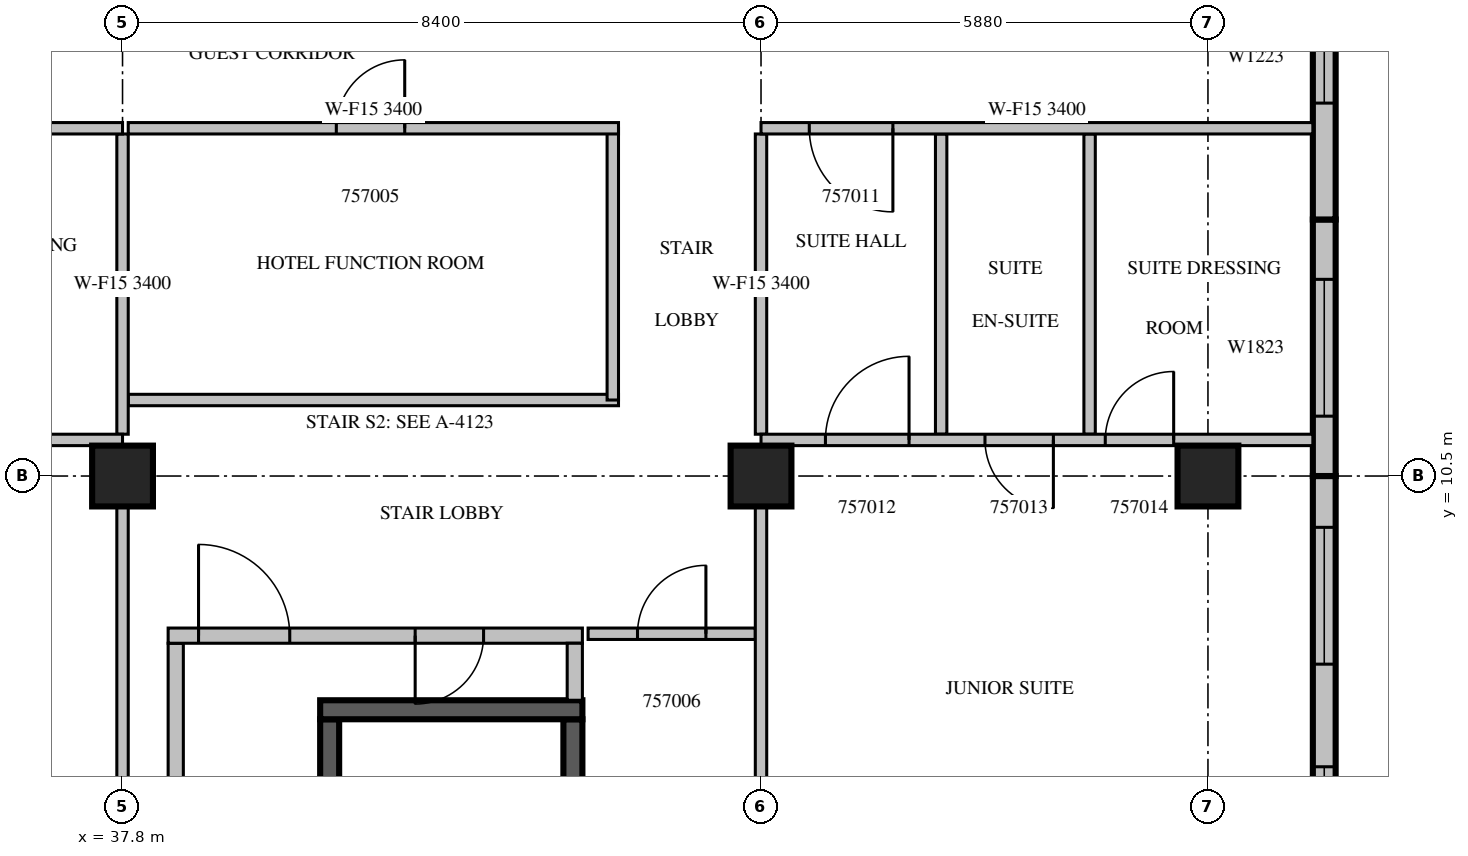
"""IFC4 building model, lengths in metres.
Left out: names, types, materials, properties, quantities, classifications, styles, units other than length and angle.
Written with IfcOpenShell. Run it as: python <this file> out.ifc"""

import sys

from ifc_helpers import new_model, si_unit, direction, frame, frame_2d, origin, origin_2d, place, context, subcontext, project, spatial, rectangle, extrude, source, transform, mapped, element, fill, save


model = new_model("IFC4")
c1 = context("Model", 3, precision=1e-05, world=origin(), true_north=direction((0.0, 1.0)))
c2 = subcontext(c1, "Body", "Model", "MODEL_VIEW")
j1 = project(units=[si_unit("LENGTHUNIT", "METRE"), si_unit("PLANEANGLEUNIT", "RADIAN")], contexts=[c1])
p1 = place(None, origin())
s1 = spatial("IfcSite", under=j1, at=p1, CompositionType="ELEMENT")
p2 = place(p1, origin())
s2 = spatial("IfcBuilding", under=s1, at=p2, CompositionType="ELEMENT")
p3 = place(p2, frame((0.0, 0.0, 250.0)))
s3 = spatial("IfcBuildingStorey", under=s2, at=p3, CompositionType="ELEMENT", Elevation=250.0)
m1 = source(origin(), c2, "Body", "SweptSolid", [
    extrude(rectangle(XDim=0.8, YDim=0.8, at=origin_2d()), origin(), (0.0, 0.0, 1.0), 3.8),
])
for number, where, z_axis, x_axis in (
    (1, (37.8, 10.5, 0.0), (0.0, 0.0, 1.0), (1.0, 0.0, 0.0)),
    (2, (46.2, 10.5, 0.0), (0.0, 0.0, 1.0), (1.0, 0.0, 0.0)),
    (3, (52.08, 10.5, 0.0), (0.0, 0.0, 1.0), (1.0, 0.0, 0.0)),
):
    element("IfcColumn", number, at=place(p3, frame(where, z_axis=z_axis, x_axis=x_axis)), inside=s3, PredefinedType="COLUMN", context=c2, shape_type="MappedRepresentation", body=[
        mapped(m1, transform((0.0, 0.0, 0.0), scale=1.0)),
    ])
m2 = source(origin(), c2, "Body", "SweptSolid", [
    extrude(rectangle(XDim=6.3, YDim=0.3, at=frame_2d((3.15, 0.0))), origin(), (0.0, 0.0, 1.0), 3.4),
])
p4 = place(p3, frame((53.61, 4.2, 0.0), z_axis=(0.0, 0.0, 1.0), x_axis=(0.0, 1.0, 0.0)))
e4 = element("IfcWall", 4, at=p4, inside=s3, PredefinedType="STANDARD", context=c2, shape_type="MappedRepresentation", body=[
    mapped(m2, transform((0.0, 0.0, 0.0), scale=1.0)),
])
m3 = source(origin(), c2, "Body", "SweptSolid", [
    extrude(rectangle(XDim=1.8, YDim=2.3, at=frame_2d((0.9, 1.15))), frame((0.0, 0.16, 0.0), z_axis=(0.0, -1.0, 0.0), x_axis=(1.0, 0.0, 0.0)), (0.0, 0.0, 1.0), 0.32),
])
p5 = place(p4, frame((0.675, 0.0, 0.6)))
e5 = element("IfcOpeningElement", 5, at=p5, cuts=e4, PredefinedType="OPENING", context=c2, shape_type="MappedRepresentation", body=[
    mapped(m3, transform((0.0, 0.0, 0.0), scale=1.0)),
])
p6 = place(p4, frame((3.825, 0.0, 0.6)))
e6 = element("IfcOpeningElement", 6, at=p6, cuts=e4, PredefinedType="OPENING", context=c2, shape_type="MappedRepresentation", body=[
    mapped(m3, transform((0.0, 0.0, 0.0), scale=1.0)),
])
m4 = source(origin(), c2, "Body", "SweptSolid", [
    extrude(rectangle(XDim=3.375, YDim=0.3, at=frame_2d((1.688, 0.0))), origin(), (0.0, 0.0, 1.0), 3.4),
])
p7 = place(p3, frame((53.61, 10.5, 0.0), z_axis=(0.0, 0.0, 1.0), x_axis=(0.0, 1.0, 0.0)))
e7 = element("IfcWall", 7, at=p7, inside=s3, PredefinedType="STANDARD", context=c2, shape_type="MappedRepresentation", body=[
    mapped(m4, transform((0.0, 0.0, 0.0), scale=1.0)),
])
p8 = place(p7, frame((0.787, 0.0, 0.6)))
e8 = element("IfcOpeningElement", 8, at=p8, cuts=e7, PredefinedType="OPENING", context=c2, shape_type="MappedRepresentation", body=[
    mapped(m3, transform((0.0, 0.0, 0.0), scale=1.0)),
])
p9 = place(p3, frame((53.61, 13.875, 0.0), z_axis=(0.0, 0.0, 1.0), x_axis=(0.0, 1.0, 0.0)))
e9 = element("IfcWall", 9, at=p9, inside=s3, PredefinedType="STANDARD", context=c2, shape_type="MappedRepresentation", body=[
    mapped(m4, transform((0.0, 0.0, 0.0), scale=1.0)),
])
m5 = source(origin(), c2, "Body", "SweptSolid", [
    extrude(rectangle(XDim=1.2, YDim=2.3, at=frame_2d((0.6, 1.15))), frame((0.0, 0.16, 0.0), z_axis=(0.0, -1.0, 0.0), x_axis=(1.0, 0.0, 0.0)), (0.0, 0.0, 1.0), 0.32),
])
p10 = place(p9, frame((1.531, 0.0, 0.6)))
e10 = element("IfcOpeningElement", 10, at=p10, cuts=e9, PredefinedType="OPENING", context=c2, shape_type="MappedRepresentation", body=[
    mapped(m5, transform((0.0, 0.0, 0.0), scale=1.0)),
])
m6 = source(origin(), c2, "Body", "SweptSolid", [
    extrude(rectangle(XDim=7.0, YDim=0.25, at=frame_2d((3.5, 0.0))), origin(), (0.0, 0.0, 1.0), 3.4),
])
p11 = place(p3, frame((40.525, 0.3, 0.0), z_axis=(0.0, 0.0, 1.0), x_axis=(0.0, 1.0, 0.0)))
e11 = element("IfcWall", 11, at=p11, inside=s3, PredefinedType="SOLIDWALL", context=c2, shape_type="MappedRepresentation", body=[
    mapped(m6, transform((0.0, 0.0, 0.0), scale=1.0)),
])
m7 = source(origin(), c2, "Body", "SweptSolid", [
    extrude(rectangle(XDim=1.1, YDim=2.1, at=frame_2d((0.55, 1.05))), frame((0.0, 0.135, 0.0), z_axis=(0.0, -1.0, 0.0), x_axis=(1.0, 0.0, 0.0)), (0.0, 0.0, 1.0), 0.27),
])
p12 = place(p11, frame((0.55, 0.0, 0.0)))
e12 = element("IfcOpeningElement", 12, at=p12, cuts=e11, PredefinedType="OPENING", context=c2, shape_type="MappedRepresentation", body=[
    mapped(m7, transform((0.0, 0.0, 0.0), scale=1.0)),
])
p13 = place(p3, frame((43.725, 0.3, 0.0), z_axis=(0.0, 0.0, 1.0), x_axis=(0.0, 1.0, 0.0)))
e13 = element("IfcWall", 13, at=p13, inside=s3, PredefinedType="SOLIDWALL", context=c2, shape_type="MappedRepresentation", body=[
    mapped(m6, transform((0.0, 0.0, 0.0), scale=1.0)),
])
m8 = source(origin(), c2, "Body", "SweptSolid", [
    extrude(rectangle(XDim=3.45, YDim=0.25, at=frame_2d((1.725, 0.0))), origin(), (0.0, 0.0, 1.0), 3.4),
])
p14 = place(p3, frame((40.4, 7.425, 0.0), z_axis=(0.0, 0.0, 1.0), x_axis=(1.0, 0.0, 0.0)))
e14 = element("IfcWall", 14, at=p14, inside=s3, PredefinedType="SOLIDWALL", context=c2, shape_type="MappedRepresentation", body=[
    mapped(m8, transform((0.0, 0.0, 0.0), scale=1.0)),
])
m9 = source(origin(), c2, "Body", "SweptSolid", [
    extrude(rectangle(XDim=8.0, YDim=0.2, at=frame_2d((4.0, 0.0))), origin(), (0.0, 0.0, 1.0), 3.4),
])
p15 = place(p3, frame((38.5, 0.3, 0.0), z_axis=(0.0, 0.0, 1.0), x_axis=(0.0, 1.0, 0.0)))
e15 = element("IfcWall", 15, at=p15, inside=s3, PredefinedType="PARTITIONING", context=c2, shape_type="MappedRepresentation", body=[
    mapped(m9, transform((0.0, 0.0, 0.0), scale=1.0)),
])
m10 = source(origin(), c2, "Body", "SweptSolid", [
    extrude(rectangle(XDim=5.45, YDim=0.2, at=frame_2d((2.725, 0.0))), origin(), (0.0, 0.0, 1.0), 3.4),
])
p16 = place(p3, frame((38.4, 8.4, 0.0), z_axis=(0.0, 0.0, 1.0), x_axis=(1.0, 0.0, 0.0)))
e16 = element("IfcWall", 16, at=p16, inside=s3, PredefinedType="PARTITIONING", context=c2, shape_type="MappedRepresentation", body=[
    mapped(m10, transform((0.0, 0.0, 0.0), scale=1.0)),
])
m11 = source(origin(), c2, "Body", "SweptSolid", [
    extrude(rectangle(XDim=1.2, YDim=2.1, at=frame_2d((0.6, 1.05))), frame((0.0, 0.11, 0.0), z_axis=(0.0, -1.0, 0.0), x_axis=(1.0, 0.0, 0.0)), (0.0, 0.0, 1.0), 0.22),
])
p17 = place(p16, frame((0.4, 0.0, 0.0)))
e17 = element("IfcOpeningElement", 17, at=p17, cuts=e16, PredefinedType="OPENING", context=c2, shape_type="MappedRepresentation", body=[
    mapped(m11, transform((0.0, 0.0, 0.0), scale=1.0)),
])
m12 = source(origin(), c2, "Body", "SweptSolid", [
    extrude(rectangle(XDim=0.9, YDim=2.1, at=frame_2d((0.45, 1.05))), frame((0.0, 0.11, 0.0), z_axis=(0.0, -1.0, 0.0), x_axis=(1.0, 0.0, 0.0)), (0.0, 0.0, 1.0), 0.22),
])
p18 = place(p16, frame((3.25, 0.0, 0.0)))
e18 = element("IfcOpeningElement", 18, at=p18, cuts=e16, PredefinedType="OPENING", context=c2, shape_type="MappedRepresentation", body=[
    mapped(m12, transform((0.0, 0.0, 0.0), scale=1.0)),
])
m13 = source(origin(), c2, "Body", "SweptSolid", [
    extrude(rectangle(XDim=0.75, YDim=0.2, at=frame_2d((0.375, 0.0))), origin(), (0.0, 0.0, 1.0), 3.4),
])
p19 = place(p3, frame((43.75, 7.55, 0.0), z_axis=(0.0, 0.0, 1.0), x_axis=(0.0, 1.0, 0.0)))
e19 = element("IfcWall", 19, at=p19, inside=s3, PredefinedType="PARTITIONING", context=c2, shape_type="MappedRepresentation", body=[
    mapped(m13, transform((0.0, 0.0, 0.0), scale=1.0)),
])
m14 = source(origin(), c2, "Body", "SweptSolid", [
    extrude(rectangle(XDim=6.45, YDim=0.15, at=frame_2d((3.225, 0.0))), origin(), (0.0, 0.0, 1.0), 3.4),
])
p20 = place(p3, frame((37.875, 11.5, 0.0), z_axis=(0.0, 0.0, 1.0), x_axis=(1.0, 0.0, 0.0)))
e20 = element("IfcWall", 20, at=p20, inside=s3, PredefinedType="PARTITIONING", context=c2, shape_type="MappedRepresentation", body=[
    mapped(m14, transform((0.0, 0.0, 0.0), scale=1.0)),
])
m15 = source(origin(), c2, "Body", "SweptSolid", [
    extrude(rectangle(XDim=3.575, YDim=0.15, at=frame_2d((1.788, 0.0))), origin(), (0.0, 0.0, 1.0), 3.4),
])
p21 = place(p3, frame((44.25, 11.5, 0.0), z_axis=(0.0, 0.0, 1.0), x_axis=(0.0, 1.0, 0.0)))
e21 = element("IfcWall", 21, at=p21, inside=s3, PredefinedType="PARTITIONING", context=c2, shape_type="MappedRepresentation", body=[
    mapped(m15, transform((0.0, 0.0, 0.0), scale=1.0)),
])
p22 = place(p3, frame((44.325, 15.075, 0.0), z_axis=(0.0, 0.0, 1.0), x_axis=(-1.0, 0.0, 0.0)))
e22 = element("IfcWall", 22, at=p22, inside=s3, PredefinedType="PARTITIONING", context=c2, shape_type="MappedRepresentation", body=[
    mapped(m14, transform((0.0, 0.0, 0.0), scale=1.0)),
])
m16 = source(origin(), c2, "Body", "SweptSolid", [
    extrude(rectangle(XDim=0.9, YDim=2.1, at=frame_2d((0.45, 1.05))), frame((0.0, 0.085, 0.0), z_axis=(0.0, -1.0, 0.0), x_axis=(1.0, 0.0, 0.0)), (0.0, 0.0, 1.0), 0.17),
])
p23 = place(p22, frame((2.812, 0.0, 0.0)))
e23 = element("IfcOpeningElement", 23, at=p23, cuts=e22, PredefinedType="OPENING", context=c2, shape_type="MappedRepresentation", body=[
    mapped(m16, transform((0.0, 0.0, 0.0), scale=1.0)),
])
m17 = source(origin(), c2, "Body", "SweptSolid", [
    extrude(rectangle(XDim=2.2, YDim=0.15, at=frame_2d((1.1, 0.0))), origin(), (0.0, 0.0, 1.0), 3.4),
])
p24 = place(p3, frame((46.125, 8.425, 0.0), z_axis=(0.0, 0.0, 1.0), x_axis=(-1.0, 0.0, 0.0)))
e24 = element("IfcWall", 24, at=p24, inside=s3, PredefinedType="PARTITIONING", context=c2, shape_type="MappedRepresentation", body=[
    mapped(m17, transform((0.0, 0.0, 0.0), scale=1.0)),
])
p25 = place(p24, frame((0.65, 0.0, 0.0)))
e25 = element("IfcOpeningElement", 25, at=p25, cuts=e24, PredefinedType="OPENING", context=c2, shape_type="MappedRepresentation", body=[
    mapped(m16, transform((0.0, 0.0, 0.0), scale=1.0)),
])
m18 = source(origin(), c2, "Body", "SweptSolid", [
    extrude(rectangle(XDim=9.302, YDim=0.15, at=frame_2d((4.651, 0.0))), origin(), (0.0, 0.0, 1.0), 3.4),
])
p26 = place(p3, frame((37.8, 0.799, 0.0), z_axis=(0.0, 0.0, 1.0), x_axis=(0.0, 1.0, 0.0)))
e26 = element("IfcWall", 26, at=p26, inside=s3, PredefinedType="PARTITIONING", context=c2, shape_type="MappedRepresentation", body=[
    mapped(m18, transform((0.0, 0.0, 0.0), scale=1.0)),
])
m19 = source(origin(), c2, "Body", "SweptSolid", [
    extrude(rectangle(XDim=3.95, YDim=0.15, at=frame_2d((1.975, 0.0))), origin(), (0.0, 0.0, 1.0), 3.4),
])
p27 = place(p3, frame((37.8, 11.05, 0.0), z_axis=(0.0, 0.0, 1.0), x_axis=(0.0, 1.0, 0.0)))
e27 = element("IfcWall", 27, at=p27, inside=s3, PredefinedType="PARTITIONING", context=c2, shape_type="MappedRepresentation", body=[
    mapped(m19, transform((0.0, 0.0, 0.0), scale=1.0)),
])
m20 = source(origin(), c2, "Body", "SweptSolid", [
    extrude(rectangle(XDim=8.4, YDim=0.15, at=frame_2d((4.2, 0.0))), origin(), (0.0, 0.0, 1.0), 2.9),
])
p28 = place(p3, frame((37.8, 10.975, 0.0), z_axis=(0.0, 0.0, 1.0), x_axis=(-1.0, 0.0, 0.0)))
e28 = element("IfcWall", 28, at=p28, inside=s3, PredefinedType="PARTITIONING", context=c2, shape_type="MappedRepresentation", body=[
    mapped(m20, transform((0.0, 0.0, 0.0), scale=1.0)),
])
m21 = source(origin(), c2, "Body", "SweptSolid", [
    extrude(rectangle(XDim=1.1, YDim=2.1, at=frame_2d((0.55, 1.05))), frame((0.0, 0.085, 0.0), z_axis=(0.0, -1.0, 0.0), x_axis=(1.0, 0.0, 0.0)), (0.0, 0.0, 1.0), 0.17),
])
p29 = place(p28, frame((6.449, 0.0, 0.0)))
e29 = element("IfcOpeningElement", 29, at=p29, cuts=e28, PredefinedType="OPENING", context=c2, shape_type="MappedRepresentation", body=[
    mapped(m21, transform((0.0, 0.0, 0.0), scale=1.0)),
])
p30 = place(p28, frame((4.12, 0.0, 0.0)))
e30 = element("IfcOpeningElement", 30, at=p30, cuts=e28, PredefinedType="OPENING", context=c2, shape_type="MappedRepresentation", body=[
    mapped(m16, transform((0.0, 0.0, 0.0), scale=1.0)),
])
p31 = place(p28, frame((1.321, 0.0, 0.0)))
e31 = element("IfcOpeningElement", 31, at=p31, cuts=e28, PredefinedType="OPENING", context=c2, shape_type="MappedRepresentation", body=[
    mapped(m16, transform((0.0, 0.0, 0.0), scale=1.0)),
])
for number, where, z_axis, x_axis in (
    (32, (48.57, 11.05, 0.0), (0.0, 0.0, 1.0), (0.0, 1.0, 0.0)),
    (33, (50.523, 11.05, 0.0), (0.0, 0.0, 1.0), (0.0, 1.0, 0.0)),
):
    element("IfcWall", number, at=place(p3, frame(where, z_axis=z_axis, x_axis=x_axis)), inside=s3, PredefinedType="PARTITIONING", context=c2, shape_type="MappedRepresentation", body=[
        mapped(m19, transform((0.0, 0.0, 0.0), scale=1.0)),
    ])
p32 = place(p3, frame((46.2, 0.799, 0.0), z_axis=(0.0, 0.0, 1.0), x_axis=(0.0, 1.0, 0.0)))
e34 = element("IfcWall", 34, at=p32, inside=s3, PredefinedType="PARTITIONING", context=c2, shape_type="MappedRepresentation", body=[
    mapped(m18, transform((0.0, 0.0, 0.0), scale=1.0)),
])
p33 = place(p3, frame((46.2, 11.05, 0.0), z_axis=(0.0, 0.0, 1.0), x_axis=(0.0, 1.0, 0.0)))
e35 = element("IfcWall", 35, at=p33, inside=s3, PredefinedType="PARTITIONING", context=c2, shape_type="MappedRepresentation", body=[
    mapped(m19, transform((0.0, 0.0, 0.0), scale=1.0)),
])
m22 = source(origin(), c2, "Body", "SweptSolid", [
    extrude(rectangle(XDim=7.26, YDim=0.15, at=frame_2d((3.63, 0.0))), origin(), (0.0, 0.0, 1.0), 3.4),
])
p34 = place(p3, frame((53.46, 10.975, 0.0), z_axis=(0.0, 0.0, 1.0), x_axis=(-1.0, 0.0, 0.0)))
e36 = element("IfcWall", 36, at=p34, inside=s3, PredefinedType="PARTITIONING", context=c2, shape_type="MappedRepresentation", body=[
    mapped(m22, transform((0.0, 0.0, 0.0), scale=1.0)),
])
p35 = place(p34, frame((5.313, 0.0, 0.0)))
e37 = element("IfcOpeningElement", 37, at=p35, cuts=e36, PredefinedType="OPENING", context=c2, shape_type="MappedRepresentation", body=[
    mapped(m21, transform((0.0, 0.0, 0.0), scale=1.0)),
])
p36 = place(p34, frame((3.414, 0.0, 0.0)))
e38 = element("IfcOpeningElement", 38, at=p36, cuts=e36, PredefinedType="OPENING", context=c2, shape_type="MappedRepresentation", body=[
    mapped(m16, transform((0.0, 0.0, 0.0), scale=1.0)),
])
p37 = place(p34, frame((1.831, 0.0, 0.0)))
e39 = element("IfcOpeningElement", 39, at=p37, cuts=e36, PredefinedType="OPENING", context=c2, shape_type="MappedRepresentation", body=[
    mapped(m16, transform((0.0, 0.0, 0.0), scale=1.0)),
])
p38 = place(p3, frame((37.8, 15.075, 0.0), z_axis=(0.0, 0.0, 1.0), x_axis=(-1.0, 0.0, 0.0)))
e40 = element("IfcWall", 40, at=p38, inside=s3, PredefinedType="PARTITIONING", context=c2, shape_type="MappedRepresentation", body=[
    mapped(m20, transform((0.0, 0.0, 0.0), scale=1.0)),
])
p39 = place(p38, frame((6.662, 0.0, 0.0)))
e41 = element("IfcOpeningElement", 41, at=p39, cuts=e40, PredefinedType="OPENING", context=c2, shape_type="MappedRepresentation", body=[
    mapped(m21, transform((0.0, 0.0, 0.0), scale=1.0)),
])
p40 = place(p3, frame((53.46, 15.075, 0.0), z_axis=(0.0, 0.0, 1.0), x_axis=(-1.0, 0.0, 0.0)))
e42 = element("IfcWall", 42, at=p40, inside=s3, PredefinedType="PARTITIONING", context=c2, shape_type="MappedRepresentation", body=[
    mapped(m22, transform((0.0, 0.0, 0.0), scale=1.0)),
])
p41 = place(p40, frame((5.525, 0.0, 0.0)))
e43 = element("IfcOpeningElement", 43, at=p41, cuts=e42, PredefinedType="OPENING", context=c2, shape_type="MappedRepresentation", body=[
    mapped(m21, transform((0.0, 0.0, 0.0), scale=1.0)),
])
m23 = source(origin(), c2, "Body", "SweptSolid", [
    extrude(rectangle(XDim=1.8, YDim=2.3, at=frame_2d((0.9, 1.15))), frame((0.0, 0.03, 0.0), z_axis=(0.0, -1.0, 0.0), x_axis=(1.0, 0.0, 0.0)), (0.0, 0.0, 1.0), 0.06),
])
p42 = place(p5, origin())
e44 = element("IfcWindow", 44, at=p42, inside=s3, PartitioningType="SINGLE_PANEL", PredefinedType="WINDOW", context=c2, shape_type="MappedRepresentation", body=[
    mapped(m23, transform((0.0, 0.0, 0.0), scale=1.0)),
])
fill(e5, e44)
p43 = place(p6, origin())
e45 = element("IfcWindow", 45, at=p43, inside=s3, PartitioningType="SINGLE_PANEL", PredefinedType="WINDOW", context=c2, shape_type="MappedRepresentation", body=[
    mapped(m23, transform((0.0, 0.0, 0.0), scale=1.0)),
])
fill(e6, e45)
p44 = place(p8, origin())
e46 = element("IfcWindow", 46, at=p44, inside=s3, PartitioningType="SINGLE_PANEL", PredefinedType="WINDOW", context=c2, shape_type="MappedRepresentation", body=[
    mapped(m23, transform((0.0, 0.0, 0.0), scale=1.0)),
])
fill(e8, e46)
m24 = source(origin(), c2, "Body", "SweptSolid", [
    extrude(rectangle(XDim=1.2, YDim=2.3, at=frame_2d((0.6, 1.15))), frame((0.0, 0.03, 0.0), z_axis=(0.0, -1.0, 0.0), x_axis=(1.0, 0.0, 0.0)), (0.0, 0.0, 1.0), 0.06),
])
p45 = place(p10, origin())
e47 = element("IfcWindow", 47, at=p45, inside=s3, PartitioningType="SINGLE_PANEL", PredefinedType="WINDOW", context=c2, shape_type="MappedRepresentation", body=[
    mapped(m24, transform((0.0, 0.0, 0.0), scale=1.0)),
])
fill(e10, e47)
m25 = source(origin(), c2, "Body", "SweptSolid", [
    extrude(rectangle(XDim=1.2, YDim=2.1, at=frame_2d((0.6, 1.05))), frame((0.0, 0.025, 0.0), z_axis=(0.0, -1.0, 0.0), x_axis=(1.0, 0.0, 0.0)), (0.0, 0.0, 1.0), 0.05),
])
p46 = place(p17, origin())
e48 = element("IfcDoor", 48, at=p46, inside=s3, OperationType="SINGLE_SWING_LEFT", PredefinedType="DOOR", context=c2, shape_type="MappedRepresentation", body=[
    mapped(m25, transform((0.0, 0.0, 0.0), scale=1.0)),
])
fill(e17, e48)
m26 = source(origin(), c2, "Body", "SweptSolid", [
    extrude(rectangle(XDim=0.9, YDim=2.1, at=frame_2d((0.45, 1.05))), frame((0.0, 0.025, 0.0), z_axis=(0.0, -1.0, 0.0), x_axis=(1.0, 0.0, 0.0)), (0.0, 0.0, 1.0), 0.05),
])
p47 = place(p18, origin())
e49 = element("IfcDoor", 49, at=p47, inside=s3, OperationType="SINGLE_SWING_RIGHT", PredefinedType="DOOR", context=c2, shape_type="MappedRepresentation", body=[
    mapped(m26, transform((0.0, 0.0, 0.0), scale=1.0)),
])
fill(e18, e49)
p48 = place(p23, origin())
e50 = element("IfcDoor", 50, at=p48, inside=s3, OperationType="SINGLE_SWING_RIGHT", PredefinedType="DOOR", context=c2, shape_type="MappedRepresentation", body=[
    mapped(m26, transform((0.0, 0.0, 0.0), scale=1.0)),
])
fill(e23, e50)
p49 = place(p25, origin())
e51 = element("IfcDoor", 51, at=p49, inside=s3, OperationType="SINGLE_SWING_RIGHT", PredefinedType="DOOR", context=c2, shape_type="MappedRepresentation", body=[
    mapped(m26, transform((0.0, 0.0, 0.0), scale=1.0)),
])
fill(e25, e51)
m27 = source(origin(), c2, "Body", "SweptSolid", [
    extrude(rectangle(XDim=1.1, YDim=2.1, at=frame_2d((0.55, 1.05))), frame((0.0, 0.025, 0.0), z_axis=(0.0, -1.0, 0.0), x_axis=(1.0, 0.0, 0.0)), (0.0, 0.0, 1.0), 0.05),
])
p50 = place(p41, origin())
e52 = element("IfcDoor", 52, at=p50, inside=s3, OperationType="SINGLE_SWING_LEFT", PredefinedType="DOOR", context=c2, shape_type="MappedRepresentation", body=[
    mapped(m27, transform((0.0, 0.0, 0.0), scale=1.0)),
])
fill(e43, e52)
p51 = place(p35, origin())
e53 = element("IfcDoor", 53, at=p51, inside=s3, OperationType="SINGLE_SWING_RIGHT", PredefinedType="DOOR", context=c2, shape_type="MappedRepresentation", body=[
    mapped(m27, transform((0.0, 0.0, 0.0), scale=1.0)),
])
fill(e37, e53)
p52 = place(p36, origin())
e54 = element("IfcDoor", 54, at=p52, inside=s3, OperationType="SINGLE_SWING_LEFT", PredefinedType="DOOR", context=c2, shape_type="MappedRepresentation", body=[
    mapped(m26, transform((0.0, 0.0, 0.0), scale=1.0)),
])
fill(e38, e54)
p53 = place(p37, origin())
e55 = element("IfcDoor", 55, at=p53, inside=s3, OperationType="SINGLE_SWING_RIGHT", PredefinedType="DOOR", context=c2, shape_type="MappedRepresentation", body=[
    mapped(m26, transform((0.0, 0.0, 0.0), scale=1.0)),
])
fill(e39, e55)
save(model, sys.argv[1])
